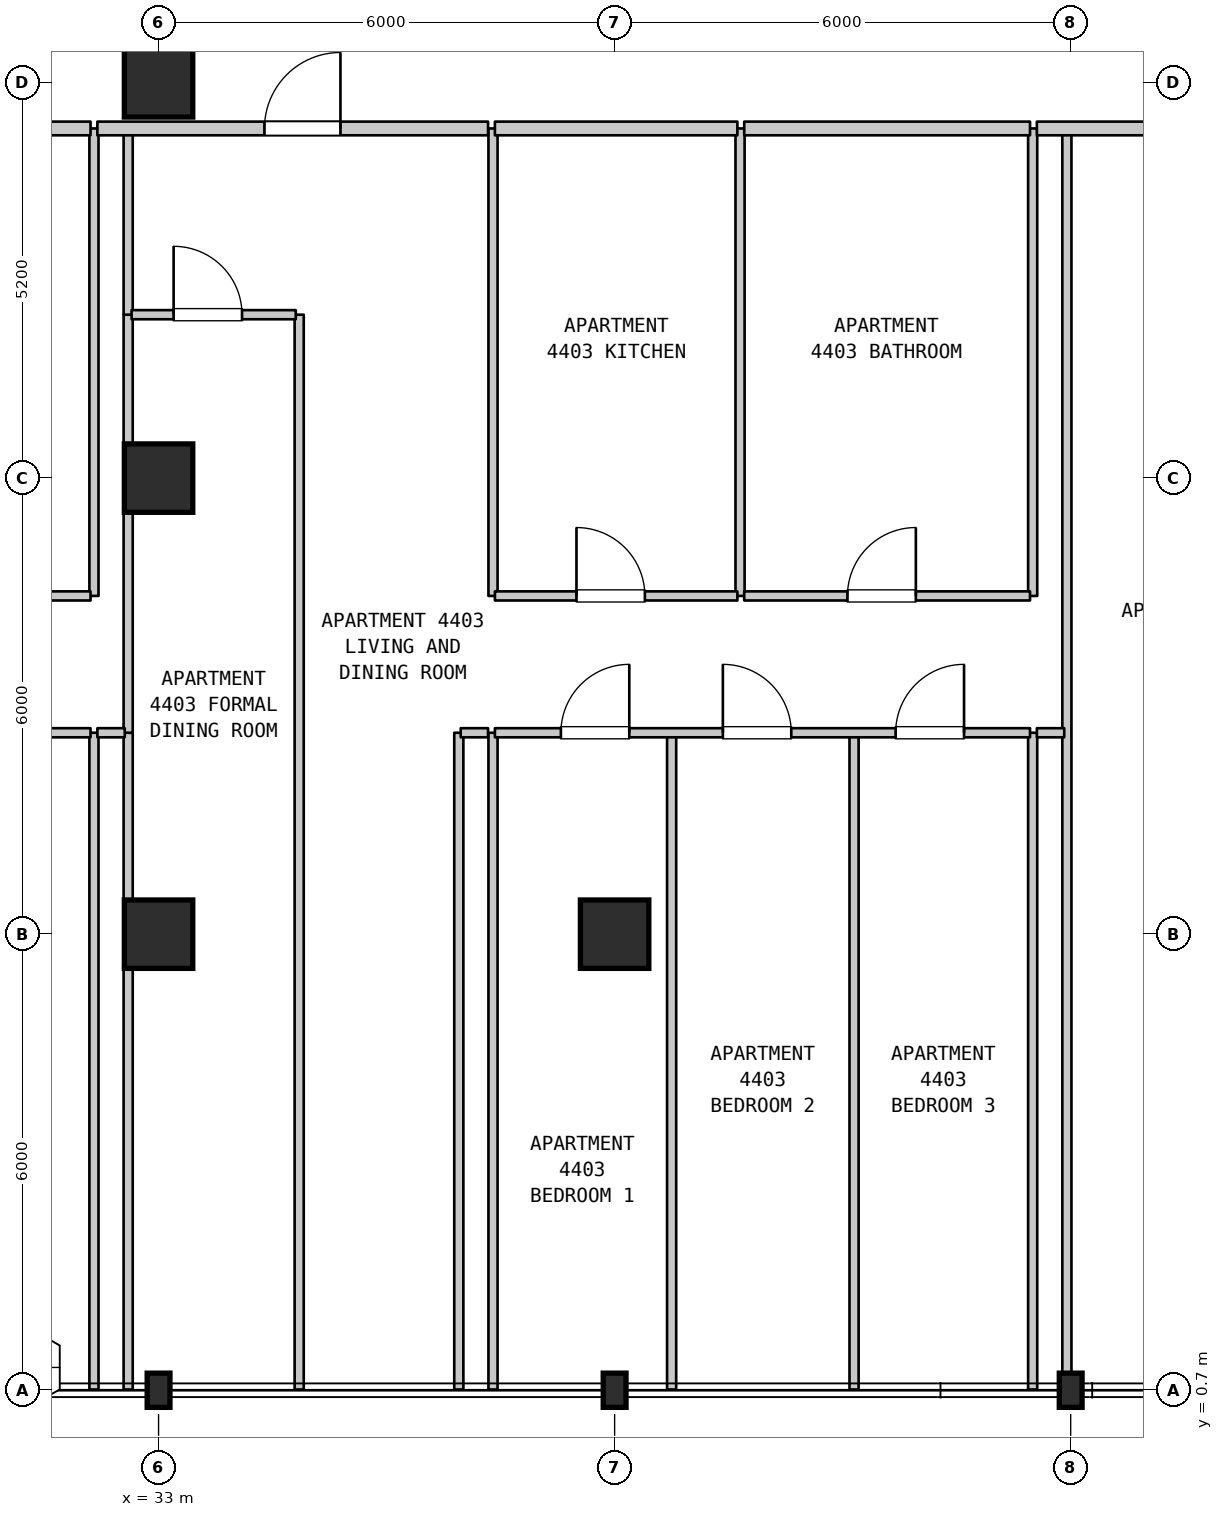
"""IFC4 building model, lengths in metres.
Left out: names, types, materials, properties, quantities, classifications, styles, units other than length and angle.
Written with IfcOpenShell. Run it as: python <this file> out.ifc"""

import sys

from ifc_helpers import new_model, si_unit, direction, frame, frame_2d, origin, origin_2d, place, context, subcontext, project, spatial, rectangle, i_section, extrude, element, fill, save


model = new_model("IFC4")
c1 = context("Model", 3, precision=1e-05, world=origin(), true_north=direction((0.0, 1.0)))
c2 = subcontext(c1, "Body", "Model", "MODEL_VIEW")
j1 = project(units=[si_unit("LENGTHUNIT", "METRE"), si_unit("PLANEANGLEUNIT", "RADIAN")], contexts=[c1])
p1 = place(None, origin())
s1 = spatial("IfcSite", under=j1, at=p1, CompositionType="ELEMENT")
p2 = place(p1, origin())
s2 = spatial("IfcBuilding", under=s1, at=p2, CompositionType="ELEMENT")
p3 = place(p2, frame((0.0, 0.0, 180.2)))
s3 = spatial("IfcBuildingStorey", under=s2, at=p3, CompositionType="ELEMENT", Elevation=180.2)
p4 = place(p3, frame((33.0, 0.7, 0.0), z_axis=(0.0, 0.0, 1.0), x_axis=(1.0, 0.0, 0.0)))
e1 = element("IfcColumn", 1, at=p4, inside=s3, PredefinedType="COLUMN", context=c2, shape_type="SweptSolid", body=[
    extrude(i_section(OverallWidth=0.3, OverallDepth=0.45, WebThickness=0.014, FlangeThickness=0.026, FilletRadius=0.027, at=origin_2d()), origin(), (0.0, 0.0, 1.0), 3.7),
])
for number, where, z_axis, x_axis in (
    (2, (33.0, 6.7, 0.0), (0.0, 0.0, 1.0), (1.0, 0.0, 0.0)),
    (3, (33.0, 12.7, 0.0), (0.0, 0.0, 1.0), (1.0, 0.0, 0.0)),
    (4, (33.0, 17.9, 0.0), (0.0, 0.0, 1.0), (1.0, 0.0, 0.0)),
):
    element("IfcColumn", number, at=place(p3, frame(where, z_axis=z_axis, x_axis=x_axis)), inside=s3, PredefinedType="COLUMN", context=c2, shape_type="SweptSolid", body=[
        extrude(rectangle(XDim=0.9, YDim=0.9, at=origin_2d()), origin(), (0.0, 0.0, 1.0), 3.7),
    ])
p5 = place(p3, frame((39.0, 0.7, 0.0), z_axis=(0.0, 0.0, 1.0), x_axis=(1.0, 0.0, 0.0)))
e5 = element("IfcColumn", 5, at=p5, inside=s3, PredefinedType="COLUMN", context=c2, shape_type="SweptSolid", body=[
    extrude(i_section(OverallWidth=0.3, OverallDepth=0.45, WebThickness=0.014, FlangeThickness=0.026, FilletRadius=0.027, at=origin_2d()), origin(), (0.0, 0.0, 1.0), 3.7),
])
p6 = place(p3, frame((39.0, 6.7, 0.0), z_axis=(0.0, 0.0, 1.0), x_axis=(1.0, 0.0, 0.0)))
e6 = element("IfcColumn", 6, at=p6, inside=s3, PredefinedType="COLUMN", context=c2, shape_type="SweptSolid", body=[
    extrude(rectangle(XDim=0.9, YDim=0.9, at=origin_2d()), origin(), (0.0, 0.0, 1.0), 3.7),
])
p7 = place(p3, frame((45.0, 0.7, 0.0), z_axis=(0.0, 0.0, 1.0), x_axis=(1.0, 0.0, 0.0)))
e7 = element("IfcColumn", 7, at=p7, inside=s3, PredefinedType="COLUMN", context=c2, shape_type="SweptSolid", body=[
    extrude(i_section(OverallWidth=0.3, OverallDepth=0.45, WebThickness=0.014, FlangeThickness=0.026, FilletRadius=0.027, at=origin_2d()), origin(), (0.0, 0.0, 1.0), 3.7),
])
p8 = place(p3, frame((32.15, 0.71, 0.0), z_axis=(0.0, 0.0, 1.0), x_axis=(0.0, 1.0, 0.0)))
e8 = element("IfcWall", 8, at=p8, inside=s3, PredefinedType="PARTITIONING", context=c2, shape_type="SweptSolid", body=[
    extrude(rectangle(XDim=8.64, YDim=0.12, at=frame_2d((4.32, 0.0))), origin(), (0.0, 0.0, 1.0), 3.38),
])
p9 = place(p3, frame((32.15, 11.15, 0.0), z_axis=(0.0, 0.0, 1.0), x_axis=(0.0, 1.0, 0.0)))
e9 = element("IfcWall", 9, at=p9, inside=s3, PredefinedType="PARTITIONING", context=c2, shape_type="SweptSolid", body=[
    extrude(rectangle(XDim=6.15, YDim=0.12, at=frame_2d((3.075, 0.0))), origin(), (0.0, 0.0, 1.0), 3.38),
])
p10 = place(p3, frame((32.6, 0.71, 0.0), z_axis=(0.0, 0.0, 1.0), x_axis=(0.0, 1.0, 0.0)))
e10 = element("IfcWall", 10, at=p10, inside=s3, PredefinedType="PARTITIONING", context=c2, shape_type="SweptSolid", body=[
    extrude(rectangle(XDim=8.64, YDim=0.12, at=frame_2d((4.32, 0.0))), origin(), (0.0, 0.0, 1.0), 3.38),
])
p11 = place(p3, frame((32.6, 9.35, 0.0), z_axis=(0.0, 0.0, 1.0), x_axis=(0.0, 1.0, 0.0)))
e11 = element("IfcWall", 11, at=p11, inside=s3, PredefinedType="PARTITIONING", context=c2, shape_type="SweptSolid", body=[
    extrude(rectangle(XDim=5.5, YDim=0.12, at=frame_2d((2.75, 0.0))), origin(), (0.0, 0.0, 1.0), 3.38),
])
p12 = place(p3, frame((32.6, 14.85, 0.0), z_axis=(0.0, 0.0, 1.0), x_axis=(0.0, 1.0, 0.0)))
e12 = element("IfcWall", 12, at=p12, inside=s3, PredefinedType="PARTITIONING", context=c2, shape_type="SweptSolid", body=[
    extrude(rectangle(XDim=2.45, YDim=0.12, at=frame_2d((1.225, 0.0))), origin(), (0.0, 0.0, 1.0), 3.38),
])
p13 = place(p3, frame((34.85, 0.71, 0.0), z_axis=(0.0, 0.0, 1.0), x_axis=(0.0, 1.0, 0.0)))
e13 = element("IfcWall", 13, at=p13, inside=s3, PredefinedType="PARTITIONING", context=c2, shape_type="SweptSolid", body=[
    extrude(rectangle(XDim=14.14, YDim=0.12, at=frame_2d((7.07, 0.0))), origin(), (0.0, 0.0, 1.0), 3.38),
])
for number, where, z_axis, x_axis in (
    (14, (36.95, 0.71, 0.0), (0.0, 0.0, 1.0), (0.0, 1.0, 0.0)),
    (15, (37.4, 0.71, 0.0), (0.0, 0.0, 1.0), (0.0, 1.0, 0.0)),
):
    element("IfcWall", number, at=place(p3, frame(where, z_axis=z_axis, x_axis=x_axis)), inside=s3, PredefinedType="PARTITIONING", context=c2, shape_type="SweptSolid", body=[
        extrude(rectangle(XDim=8.64, YDim=0.12, at=frame_2d((4.32, 0.0))), origin(), (0.0, 0.0, 1.0), 3.38),
    ])
p14 = place(p3, frame((37.4, 11.15, 0.0), z_axis=(0.0, 0.0, 1.0), x_axis=(0.0, 1.0, 0.0)))
e16 = element("IfcWall", 16, at=p14, inside=s3, PredefinedType="PARTITIONING", context=c2, shape_type="SweptSolid", body=[
    extrude(rectangle(XDim=6.15, YDim=0.12, at=frame_2d((3.075, 0.0))), origin(), (0.0, 0.0, 1.0), 3.38),
])
p15 = place(p3, frame((39.75, 0.71, 0.0), z_axis=(0.0, 0.0, 1.0), x_axis=(0.0, 1.0, 0.0)))
e17 = element("IfcWall", 17, at=p15, inside=s3, PredefinedType="PARTITIONING", context=c2, shape_type="SweptSolid", body=[
    extrude(rectangle(XDim=8.64, YDim=0.12, at=frame_2d((4.32, 0.0))), origin(), (0.0, 0.0, 1.0), 3.38),
])
p16 = place(p3, frame((40.65, 11.15, 0.0), z_axis=(0.0, 0.0, 1.0), x_axis=(0.0, 1.0, 0.0)))
e18 = element("IfcWall", 18, at=p16, inside=s3, PredefinedType="PARTITIONING", context=c2, shape_type="SweptSolid", body=[
    extrude(rectangle(XDim=6.15, YDim=0.12, at=frame_2d((3.075, 0.0))), origin(), (0.0, 0.0, 1.0), 3.38),
])
for number, where, z_axis, x_axis in (
    (19, (42.15, 0.71, 0.0), (0.0, 0.0, 1.0), (0.0, 1.0, 0.0)),
    (20, (44.5, 0.71, 0.0), (0.0, 0.0, 1.0), (0.0, 1.0, 0.0)),
):
    element("IfcWall", number, at=place(p3, frame(where, z_axis=z_axis, x_axis=x_axis)), inside=s3, PredefinedType="PARTITIONING", context=c2, shape_type="SweptSolid", body=[
        extrude(rectangle(XDim=8.64, YDim=0.12, at=frame_2d((4.32, 0.0))), origin(), (0.0, 0.0, 1.0), 3.38),
    ])
p17 = place(p3, frame((44.5, 11.15, 0.0), z_axis=(0.0, 0.0, 1.0), x_axis=(0.0, 1.0, 0.0)))
e21 = element("IfcWall", 21, at=p17, inside=s3, PredefinedType="PARTITIONING", context=c2, shape_type="SweptSolid", body=[
    extrude(rectangle(XDim=6.15, YDim=0.12, at=frame_2d((3.075, 0.0))), origin(), (0.0, 0.0, 1.0), 3.38),
])
p18 = place(p3, frame((44.95, 0.71, 0.0), z_axis=(0.0, 0.0, 1.0), x_axis=(0.0, 1.0, 0.0)))
e22 = element("IfcWall", 22, at=p18, inside=s3, PredefinedType="PARTITIONING", context=c2, shape_type="SweptSolid", body=[
    extrude(rectangle(XDim=16.59, YDim=0.12, at=frame_2d((8.295, 0.0))), origin(), (0.0, 0.0, 1.0), 3.38),
])
p19 = place(p3, frame((25.375, 9.35, 0.0), z_axis=(0.0, 0.0, 1.0), x_axis=(1.0, 0.0, 0.0)))
e23 = element("IfcWall", 23, at=p19, inside=s3, PredefinedType="PARTITIONING", context=c2, shape_type="SweptSolid", body=[
    extrude(rectangle(XDim=6.73, YDim=0.12, at=frame_2d((3.365, 0.0))), origin(), (0.0, 0.0, 1.0), 3.38),
])
p20 = place(p19, frame((1.31, 0.0, 0.0)))
e24 = element("IfcOpeningElement", 24, at=p20, cuts=e23, PredefinedType="OPENING", context=c2, shape_type="SweptSolid", body=[
    extrude(rectangle(XDim=0.9, YDim=2.15, at=frame_2d((0.45, 1.075))), frame((0.0, 0.07, 0.0), z_axis=(0.0, -1.0, 0.0), x_axis=(1.0, 0.0, 0.0)), (0.0, 0.0, 1.0), 0.14),
])
p21 = place(p19, frame((4.37, 0.0, 0.0)))
e25 = element("IfcOpeningElement", 25, at=p21, cuts=e23, PredefinedType="OPENING", context=c2, shape_type="SweptSolid", body=[
    extrude(rectangle(XDim=0.9, YDim=2.15, at=frame_2d((0.45, 1.075))), frame((0.0, 0.07, 0.0), z_axis=(0.0, -1.0, 0.0), x_axis=(1.0, 0.0, 0.0)), (0.0, 0.0, 1.0), 0.14),
])
for number, where, z_axis, x_axis in (
    (26, (32.195, 9.35, 0.0), (0.0, 0.0, 1.0), (1.0, 0.0, 0.0)),
    (27, (36.975, 9.35, 0.0), (0.0, 0.0, 1.0), (1.0, 0.0, 0.0)),
):
    element("IfcWall", number, at=place(p3, frame(where, z_axis=z_axis, x_axis=x_axis)), inside=s3, PredefinedType="PARTITIONING", context=c2, shape_type="SweptSolid", body=[
        extrude(rectangle(XDim=0.36, YDim=0.12, at=frame_2d((0.18, 0.0))), origin(), (0.0, 0.0, 1.0), 3.38),
    ])
p22 = place(p3, frame((37.425, 9.35, 0.0), z_axis=(0.0, 0.0, 1.0), x_axis=(1.0, 0.0, 0.0)))
e28 = element("IfcWall", 28, at=p22, inside=s3, PredefinedType="PARTITIONING", context=c2, shape_type="SweptSolid", body=[
    extrude(rectangle(XDim=7.04, YDim=0.12, at=frame_2d((3.52, 0.0))), origin(), (0.0, 0.0, 1.0), 3.38),
])
p23 = place(p22, frame((0.868, 0.0, 0.0)))
e29 = element("IfcOpeningElement", 29, at=p23, cuts=e28, PredefinedType="OPENING", context=c2, shape_type="SweptSolid", body=[
    extrude(rectangle(XDim=0.9, YDim=2.15, at=frame_2d((0.45, 1.075))), frame((0.0, 0.07, 0.0), z_axis=(0.0, -1.0, 0.0), x_axis=(1.0, 0.0, 0.0)), (0.0, 0.0, 1.0), 0.14),
])
p24 = place(p22, frame((2.999, 0.0, 0.0)))
e30 = element("IfcOpeningElement", 30, at=p24, cuts=e28, PredefinedType="OPENING", context=c2, shape_type="SweptSolid", body=[
    extrude(rectangle(XDim=0.9, YDim=2.15, at=frame_2d((0.45, 1.075))), frame((0.0, 0.07, 0.0), z_axis=(0.0, -1.0, 0.0), x_axis=(1.0, 0.0, 0.0)), (0.0, 0.0, 1.0), 0.14),
])
p25 = place(p22, frame((5.272, 0.0, 0.0)))
e31 = element("IfcOpeningElement", 31, at=p25, cuts=e28, PredefinedType="OPENING", context=c2, shape_type="SweptSolid", body=[
    extrude(rectangle(XDim=0.9, YDim=2.15, at=frame_2d((0.45, 1.075))), frame((0.0, 0.07, 0.0), z_axis=(0.0, -1.0, 0.0), x_axis=(1.0, 0.0, 0.0)), (0.0, 0.0, 1.0), 0.14),
])
p26 = place(p3, frame((44.555, 9.35, 0.0), z_axis=(0.0, 0.0, 1.0), x_axis=(1.0, 0.0, 0.0)))
e32 = element("IfcWall", 32, at=p26, inside=s3, PredefinedType="PARTITIONING", context=c2, shape_type="SweptSolid", body=[
    extrude(rectangle(XDim=0.36, YDim=0.12, at=frame_2d((0.18, 0.0))), origin(), (0.0, 0.0, 1.0), 3.38),
])
p27 = place(p3, frame((28.512, 11.15, 0.0), z_axis=(0.0, 0.0, 1.0), x_axis=(1.0, 0.0, 0.0)))
e33 = element("IfcWall", 33, at=p27, inside=s3, PredefinedType="PARTITIONING", context=c2, shape_type="SweptSolid", body=[
    extrude(rectangle(XDim=3.593, YDim=0.12, at=frame_2d((1.796, 0.0))), origin(), (0.0, 0.0, 1.0), 3.38),
])
p28 = place(p27, frame((1.346, 0.0, 0.0)))
e34 = element("IfcOpeningElement", 34, at=p28, cuts=e33, PredefinedType="OPENING", context=c2, shape_type="SweptSolid", body=[
    extrude(rectangle(XDim=0.9, YDim=2.1, at=frame_2d((0.45, 1.05))), frame((0.0, 0.07, 0.0), z_axis=(0.0, -1.0, 0.0), x_axis=(1.0, 0.0, 0.0)), (0.0, 0.0, 1.0), 0.14),
])
p29 = place(p3, frame((37.425, 11.15, 0.0), z_axis=(0.0, 0.0, 1.0), x_axis=(1.0, 0.0, 0.0)))
e35 = element("IfcWall", 35, at=p29, inside=s3, PredefinedType="PARTITIONING", context=c2, shape_type="SweptSolid", body=[
    extrude(rectangle(XDim=3.19, YDim=0.12, at=frame_2d((1.595, 0.0))), origin(), (0.0, 0.0, 1.0), 3.38),
])
p30 = place(p29, frame((1.073, 0.0, 0.0)))
e36 = element("IfcOpeningElement", 36, at=p30, cuts=e35, PredefinedType="OPENING", context=c2, shape_type="SweptSolid", body=[
    extrude(rectangle(XDim=0.9, YDim=2.15, at=frame_2d((0.45, 1.075))), frame((0.0, 0.07, 0.0), z_axis=(0.0, -1.0, 0.0), x_axis=(1.0, 0.0, 0.0)), (0.0, 0.0, 1.0), 0.14),
])
p31 = place(p3, frame((40.705, 11.15, 0.0), z_axis=(0.0, 0.0, 1.0), x_axis=(1.0, 0.0, 0.0)))
e37 = element("IfcWall", 37, at=p31, inside=s3, PredefinedType="PARTITIONING", context=c2, shape_type="SweptSolid", body=[
    extrude(rectangle(XDim=3.76, YDim=0.12, at=frame_2d((1.88, 0.0))), origin(), (0.0, 0.0, 1.0), 3.38),
])
p32 = place(p31, frame((1.358, 0.0, 0.0)))
e38 = element("IfcOpeningElement", 38, at=p32, cuts=e37, PredefinedType="OPENING", context=c2, shape_type="SweptSolid", body=[
    extrude(rectangle(XDim=0.9, YDim=2.1, at=frame_2d((0.45, 1.05))), frame((0.0, 0.07, 0.0), z_axis=(0.0, -1.0, 0.0), x_axis=(1.0, 0.0, 0.0)), (0.0, 0.0, 1.0), 0.14),
])
p33 = place(p3, frame((32.645, 14.85, 0.0), z_axis=(0.0, 0.0, 1.0), x_axis=(1.0, 0.0, 0.0)))
e39 = element("IfcWall", 39, at=p33, inside=s3, PredefinedType="PARTITIONING", context=c2, shape_type="SweptSolid", body=[
    extrude(rectangle(XDim=2.16, YDim=0.12, at=frame_2d((1.08, 0.0))), origin(), (0.0, 0.0, 1.0), 3.38),
])
p34 = place(p33, frame((0.553, 0.0, 0.0)))
e40 = element("IfcOpeningElement", 40, at=p34, cuts=e39, PredefinedType="OPENING", context=c2, shape_type="SweptSolid", body=[
    extrude(rectangle(XDim=0.9, YDim=2.15, at=frame_2d((0.45, 1.075))), frame((0.0, 0.07, 0.0), z_axis=(0.0, -1.0, 0.0), x_axis=(1.0, 0.0, 0.0)), (0.0, 0.0, 1.0), 0.14),
])
p35 = place(p3, frame((28.512, 17.3, 0.0), z_axis=(0.0, 0.0, 1.0), x_axis=(1.0, 0.0, 0.0)))
e41 = element("IfcWall", 41, at=p35, inside=s3, PredefinedType="STANDARD", context=c2, shape_type="SweptSolid", body=[
    extrude(rectangle(XDim=3.593, YDim=0.18, at=frame_2d((1.796, 0.0))), origin(), (0.0, 0.0, 1.0), 3.38),
])
p36 = place(p3, frame((32.195, 17.3, 0.0), z_axis=(0.0, 0.0, 1.0), x_axis=(1.0, 0.0, 0.0)))
e42 = element("IfcWall", 42, at=p36, inside=s3, PredefinedType="STANDARD", context=c2, shape_type="SweptSolid", body=[
    extrude(rectangle(XDim=5.14, YDim=0.18, at=frame_2d((2.57, 0.0))), origin(), (0.0, 0.0, 1.0), 3.38),
])
p37 = place(p36, frame((2.198, 0.0, 0.0)))
e43 = element("IfcOpeningElement", 43, at=p37, cuts=e42, PredefinedType="OPENING", context=c2, shape_type="SweptSolid", body=[
    extrude(rectangle(XDim=1.0, YDim=2.15, at=frame_2d((0.5, 1.075))), frame((0.0, 0.1, 0.0), z_axis=(0.0, -1.0, 0.0), x_axis=(1.0, 0.0, 0.0)), (0.0, 0.0, 1.0), 0.2),
])
p38 = place(p3, frame((37.425, 17.3, 0.0), z_axis=(0.0, 0.0, 1.0), x_axis=(1.0, 0.0, 0.0)))
e44 = element("IfcWall", 44, at=p38, inside=s3, PredefinedType="STANDARD", context=c2, shape_type="SweptSolid", body=[
    extrude(rectangle(XDim=3.19, YDim=0.18, at=frame_2d((1.595, 0.0))), origin(), (0.0, 0.0, 1.0), 3.38),
])
p39 = place(p3, frame((40.705, 17.3, 0.0), z_axis=(0.0, 0.0, 1.0), x_axis=(1.0, 0.0, 0.0)))
e45 = element("IfcWall", 45, at=p39, inside=s3, PredefinedType="STANDARD", context=c2, shape_type="SweptSolid", body=[
    extrude(rectangle(XDim=3.76, YDim=0.18, at=frame_2d((1.88, 0.0))), origin(), (0.0, 0.0, 1.0), 3.38),
])
p40 = place(p3, frame((44.555, 17.3, 0.0), z_axis=(0.0, 0.0, 1.0), x_axis=(1.0, 0.0, 0.0)))
e46 = element("IfcWall", 46, at=p40, inside=s3, PredefinedType="STANDARD", context=c2, shape_type="SweptSolid", body=[
    extrude(rectangle(XDim=4.97, YDim=0.18, at=frame_2d((2.485, 0.0))), origin(), (0.0, 0.0, 1.0), 3.38),
])
p41 = place(p40, frame((1.913, 0.0, 0.0)))
e47 = element("IfcOpeningElement", 47, at=p41, cuts=e46, PredefinedType="OPENING", context=c2, shape_type="SweptSolid", body=[
    extrude(rectangle(XDim=1.0, YDim=2.15, at=frame_2d((0.5, 1.075))), frame((0.0, 0.1, 0.0), z_axis=(0.0, -1.0, 0.0), x_axis=(1.0, 0.0, 0.0)), (0.0, 0.0, 1.0), 0.2),
])
p42 = place(p23, origin())
e48 = element("IfcDoor", 48, at=p42, inside=s3, OperationType="SINGLE_SWING_RIGHT", PredefinedType="DOOR", context=c2, shape_type="SweptSolid", body=[
    extrude(rectangle(XDim=0.9, YDim=2.15, at=frame_2d((0.45, 1.075))), frame((0.0, 0.025, 0.0), z_axis=(0.0, -1.0, 0.0), x_axis=(1.0, 0.0, 0.0)), (0.0, 0.0, 1.0), 0.05),
])
fill(e29, e48)
p43 = place(p24, origin())
e49 = element("IfcDoor", 49, at=p43, inside=s3, OperationType="SINGLE_SWING_LEFT", PredefinedType="DOOR", context=c2, shape_type="SweptSolid", body=[
    extrude(rectangle(XDim=0.9, YDim=2.15, at=frame_2d((0.45, 1.075))), frame((0.0, 0.025, 0.0), z_axis=(0.0, -1.0, 0.0), x_axis=(1.0, 0.0, 0.0)), (0.0, 0.0, 1.0), 0.05),
])
fill(e30, e49)
p44 = place(p25, origin())
e50 = element("IfcDoor", 50, at=p44, inside=s3, OperationType="SINGLE_SWING_RIGHT", PredefinedType="DOOR", context=c2, shape_type="SweptSolid", body=[
    extrude(rectangle(XDim=0.9, YDim=2.15, at=frame_2d((0.45, 1.075))), frame((0.0, 0.025, 0.0), z_axis=(0.0, -1.0, 0.0), x_axis=(1.0, 0.0, 0.0)), (0.0, 0.0, 1.0), 0.05),
])
fill(e31, e50)
p45 = place(p30, origin())
e51 = element("IfcDoor", 51, at=p45, inside=s3, OperationType="SINGLE_SWING_LEFT", PredefinedType="DOOR", context=c2, shape_type="SweptSolid", body=[
    extrude(rectangle(XDim=0.9, YDim=2.15, at=frame_2d((0.45, 1.075))), frame((0.0, 0.025, 0.0), z_axis=(0.0, -1.0, 0.0), x_axis=(1.0, 0.0, 0.0)), (0.0, 0.0, 1.0), 0.05),
])
fill(e36, e51)
p46 = place(p32, origin())
e52 = element("IfcDoor", 52, at=p46, inside=s3, OperationType="SINGLE_SWING_RIGHT", PredefinedType="DOOR", context=c2, shape_type="SweptSolid", body=[
    extrude(rectangle(XDim=0.9, YDim=2.1, at=frame_2d((0.45, 1.05))), frame((0.0, 0.025, 0.0), z_axis=(0.0, -1.0, 0.0), x_axis=(1.0, 0.0, 0.0)), (0.0, 0.0, 1.0), 0.05),
])
fill(e38, e52)
p47 = place(p34, origin())
e53 = element("IfcDoor", 53, at=p47, inside=s3, OperationType="SINGLE_SWING_LEFT", PredefinedType="DOOR", context=c2, shape_type="SweptSolid", body=[
    extrude(rectangle(XDim=0.9, YDim=2.15, at=frame_2d((0.45, 1.075))), frame((0.0, 0.025, 0.0), z_axis=(0.0, -1.0, 0.0), x_axis=(1.0, 0.0, 0.0)), (0.0, 0.0, 1.0), 0.05),
])
fill(e40, e53)
p48 = place(p37, origin())
e54 = element("IfcDoor", 54, at=p48, inside=s3, OperationType="SINGLE_SWING_RIGHT", PredefinedType="DOOR", context=c2, shape_type="SweptSolid", body=[
    extrude(rectangle(XDim=1.0, YDim=2.15, at=frame_2d((0.5, 1.075))), frame((0.0, 0.025, 0.0), z_axis=(0.0, -1.0, 0.0), x_axis=(1.0, 0.0, 0.0)), (0.0, 0.0, 1.0), 0.05),
])
fill(e43, e54)
save(model, sys.argv[1])
